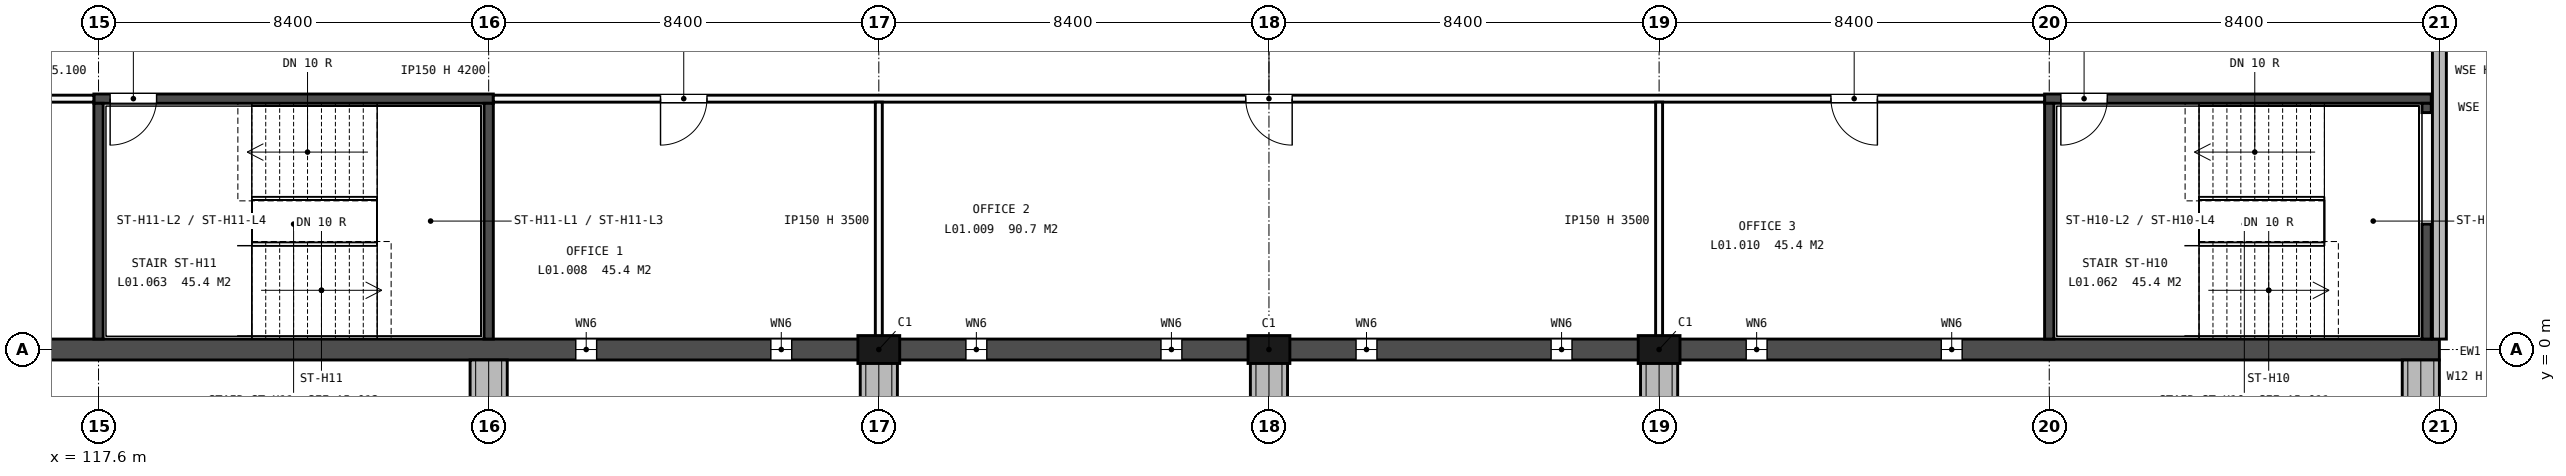
"""IFC4 building model, lengths in metres.
Left out: names, types, materials, properties, quantities, classifications, styles, units other than length and angle.
Written with IfcOpenShell. Run it as: python <this file> out.ifc"""

import sys

from ifc_helpers import new_model, si_unit, direction, frame, frame_2d, origin, origin_2d, place, context, subcontext, project, spatial, rectangle, extrude, element, fill, save


model = new_model("IFC4")
c1 = context("Model", 3, precision=1e-05, world=origin(), true_north=direction((0.0, 1.0)))
c2 = subcontext(c1, "Body", "Model", "MODEL_VIEW")
j1 = project(units=[si_unit("LENGTHUNIT", "METRE"), si_unit("PLANEANGLEUNIT", "RADIAN")], contexts=[c1])
p1 = place(None, origin())
s1 = spatial("IfcSite", under=j1, at=p1, CompositionType="ELEMENT")
p2 = place(p1, origin())
s2 = spatial("IfcBuilding", under=s1, at=p2, CompositionType="ELEMENT")
p3 = place(p2, frame((0.0, 0.0, 5.4)))
s3 = spatial("IfcBuildingStorey", under=s2, at=p3, CompositionType="ELEMENT", Elevation=5.4)
for number, where, z_axis, x_axis in (
    (1, (134.4, 0.0, -0.3), (0.0, 0.0, 1.0), (1.0, 0.0, 0.0)),
    (2, (142.8, 0.0, -0.3), (0.0, 0.0, 1.0), (1.0, 0.0, 0.0)),
    (3, (151.2, 0.0, -0.3), (0.0, 0.0, 1.0), (1.0, 0.0, 0.0)),
):
    element("IfcColumn", number, at=place(p3, frame(where, z_axis=z_axis, x_axis=x_axis)), inside=s3, PredefinedType="PILASTER", context=c2, shape_type="SweptSolid", body=[
        extrude(rectangle(XDim=0.9, YDim=0.6, at=origin_2d()), origin(), (0.0, 0.0, 1.0), 4.55),
    ])
p4 = place(p3, frame((0.0, 0.0, -0.3), z_axis=(0.0, 0.0, 1.0), x_axis=(1.0, 0.0, 0.0)))
e4 = element("IfcWall", 4, at=p4, inside=s3, PredefinedType="SOLIDWALL", context=c2, shape_type="SweptSolid", body=[
    extrude(rectangle(XDim=168.0, YDim=0.45, at=frame_2d((84.0, 0.0))), origin(), (0.0, 0.0, 1.0), 4.55),
])
p5 = place(p4, frame((27.075, 0.0, 1.5)))
e5 = element("IfcOpeningElement", 5, at=p5, cuts=e4, PredefinedType="OPENING", context=c2, shape_type="SweptSolid", body=[
    extrude(rectangle(XDim=0.45, YDim=2.4, at=frame_2d((0.225, 1.2))), frame((0.0, 0.235, 0.0), z_axis=(0.0, -1.0, 0.0), x_axis=(1.0, 0.0, 0.0)), (0.0, 0.0, 1.0), 0.47),
])
p6 = place(p4, frame((31.275, 0.0, 1.5)))
e6 = element("IfcOpeningElement", 6, at=p6, cuts=e4, PredefinedType="OPENING", context=c2, shape_type="SweptSolid", body=[
    extrude(rectangle(XDim=0.45, YDim=2.4, at=frame_2d((0.225, 1.2))), frame((0.0, 0.235, 0.0), z_axis=(0.0, -1.0, 0.0), x_axis=(1.0, 0.0, 0.0)), (0.0, 0.0, 1.0), 0.47),
])
p7 = place(p4, frame((35.475, 0.0, 1.5)))
e7 = element("IfcOpeningElement", 7, at=p7, cuts=e4, PredefinedType="OPENING", context=c2, shape_type="SweptSolid", body=[
    extrude(rectangle(XDim=0.45, YDim=2.4, at=frame_2d((0.225, 1.2))), frame((0.0, 0.235, 0.0), z_axis=(0.0, -1.0, 0.0), x_axis=(1.0, 0.0, 0.0)), (0.0, 0.0, 1.0), 0.47),
])
p8 = place(p4, frame((39.675, 0.0, 1.5)))
e8 = element("IfcOpeningElement", 8, at=p8, cuts=e4, PredefinedType="OPENING", context=c2, shape_type="SweptSolid", body=[
    extrude(rectangle(XDim=0.45, YDim=2.4, at=frame_2d((0.225, 1.2))), frame((0.0, 0.235, 0.0), z_axis=(0.0, -1.0, 0.0), x_axis=(1.0, 0.0, 0.0)), (0.0, 0.0, 1.0), 0.47),
])
p9 = place(p4, frame((94.275, 0.0, 1.5)))
e9 = element("IfcOpeningElement", 9, at=p9, cuts=e4, PredefinedType="OPENING", context=c2, shape_type="SweptSolid", body=[
    extrude(rectangle(XDim=0.45, YDim=2.4, at=frame_2d((0.225, 1.2))), frame((0.0, 0.235, 0.0), z_axis=(0.0, -1.0, 0.0), x_axis=(1.0, 0.0, 0.0)), (0.0, 0.0, 1.0), 0.47),
])
p10 = place(p4, frame((98.475, 0.0, 1.5)))
e10 = element("IfcOpeningElement", 10, at=p10, cuts=e4, PredefinedType="OPENING", context=c2, shape_type="SweptSolid", body=[
    extrude(rectangle(XDim=0.45, YDim=2.4, at=frame_2d((0.225, 1.2))), frame((0.0, 0.235, 0.0), z_axis=(0.0, -1.0, 0.0), x_axis=(1.0, 0.0, 0.0)), (0.0, 0.0, 1.0), 0.47),
])
p11 = place(p4, frame((102.675, 0.0, 1.5)))
e11 = element("IfcOpeningElement", 11, at=p11, cuts=e4, PredefinedType="OPENING", context=c2, shape_type="SweptSolid", body=[
    extrude(rectangle(XDim=0.45, YDim=2.4, at=frame_2d((0.225, 1.2))), frame((0.0, 0.235, 0.0), z_axis=(0.0, -1.0, 0.0), x_axis=(1.0, 0.0, 0.0)), (0.0, 0.0, 1.0), 0.47),
])
p12 = place(p4, frame((106.875, 0.0, 1.5)))
e12 = element("IfcOpeningElement", 12, at=p12, cuts=e4, PredefinedType="OPENING", context=c2, shape_type="SweptSolid", body=[
    extrude(rectangle(XDim=0.45, YDim=2.4, at=frame_2d((0.225, 1.2))), frame((0.0, 0.235, 0.0), z_axis=(0.0, -1.0, 0.0), x_axis=(1.0, 0.0, 0.0)), (0.0, 0.0, 1.0), 0.47),
])
p13 = place(p4, frame((111.075, 0.0, 1.5)))
e13 = element("IfcOpeningElement", 13, at=p13, cuts=e4, PredefinedType="OPENING", context=c2, shape_type="SweptSolid", body=[
    extrude(rectangle(XDim=0.45, YDim=2.4, at=frame_2d((0.225, 1.2))), frame((0.0, 0.235, 0.0), z_axis=(0.0, -1.0, 0.0), x_axis=(1.0, 0.0, 0.0)), (0.0, 0.0, 1.0), 0.47),
])
p14 = place(p4, frame((115.275, 0.0, 1.5)))
e14 = element("IfcOpeningElement", 14, at=p14, cuts=e4, PredefinedType="OPENING", context=c2, shape_type="SweptSolid", body=[
    extrude(rectangle(XDim=0.45, YDim=2.4, at=frame_2d((0.225, 1.2))), frame((0.0, 0.235, 0.0), z_axis=(0.0, -1.0, 0.0), x_axis=(1.0, 0.0, 0.0)), (0.0, 0.0, 1.0), 0.47),
])
p15 = place(p4, frame((127.875, 0.0, 1.5)))
e15 = element("IfcOpeningElement", 15, at=p15, cuts=e4, PredefinedType="OPENING", context=c2, shape_type="SweptSolid", body=[
    extrude(rectangle(XDim=0.45, YDim=2.4, at=frame_2d((0.225, 1.2))), frame((0.0, 0.235, 0.0), z_axis=(0.0, -1.0, 0.0), x_axis=(1.0, 0.0, 0.0)), (0.0, 0.0, 1.0), 0.47),
])
p16 = place(p4, frame((132.075, 0.0, 1.5)))
e16 = element("IfcOpeningElement", 16, at=p16, cuts=e4, PredefinedType="OPENING", context=c2, shape_type="SweptSolid", body=[
    extrude(rectangle(XDim=0.45, YDim=2.4, at=frame_2d((0.225, 1.2))), frame((0.0, 0.235, 0.0), z_axis=(0.0, -1.0, 0.0), x_axis=(1.0, 0.0, 0.0)), (0.0, 0.0, 1.0), 0.47),
])
p17 = place(p4, frame((136.275, 0.0, 1.5)))
e17 = element("IfcOpeningElement", 17, at=p17, cuts=e4, PredefinedType="OPENING", context=c2, shape_type="SweptSolid", body=[
    extrude(rectangle(XDim=0.45, YDim=2.4, at=frame_2d((0.225, 1.2))), frame((0.0, 0.235, 0.0), z_axis=(0.0, -1.0, 0.0), x_axis=(1.0, 0.0, 0.0)), (0.0, 0.0, 1.0), 0.47),
])
p18 = place(p4, frame((140.475, 0.0, 1.5)))
e18 = element("IfcOpeningElement", 18, at=p18, cuts=e4, PredefinedType="OPENING", context=c2, shape_type="SweptSolid", body=[
    extrude(rectangle(XDim=0.45, YDim=2.4, at=frame_2d((0.225, 1.2))), frame((0.0, 0.235, 0.0), z_axis=(0.0, -1.0, 0.0), x_axis=(1.0, 0.0, 0.0)), (0.0, 0.0, 1.0), 0.47),
])
p19 = place(p4, frame((144.675, 0.0, 1.5)))
e19 = element("IfcOpeningElement", 19, at=p19, cuts=e4, PredefinedType="OPENING", context=c2, shape_type="SweptSolid", body=[
    extrude(rectangle(XDim=0.45, YDim=2.4, at=frame_2d((0.225, 1.2))), frame((0.0, 0.235, 0.0), z_axis=(0.0, -1.0, 0.0), x_axis=(1.0, 0.0, 0.0)), (0.0, 0.0, 1.0), 0.47),
])
p20 = place(p4, frame((148.875, 0.0, 1.5)))
e20 = element("IfcOpeningElement", 20, at=p20, cuts=e4, PredefinedType="OPENING", context=c2, shape_type="SweptSolid", body=[
    extrude(rectangle(XDim=0.45, YDim=2.4, at=frame_2d((0.225, 1.2))), frame((0.0, 0.235, 0.0), z_axis=(0.0, -1.0, 0.0), x_axis=(1.0, 0.0, 0.0)), (0.0, 0.0, 1.0), 0.47),
])
p21 = place(p4, frame((153.075, 0.0, 1.5)))
e21 = element("IfcOpeningElement", 21, at=p21, cuts=e4, PredefinedType="OPENING", context=c2, shape_type="SweptSolid", body=[
    extrude(rectangle(XDim=0.45, YDim=2.4, at=frame_2d((0.225, 1.2))), frame((0.0, 0.235, 0.0), z_axis=(0.0, -1.0, 0.0), x_axis=(1.0, 0.0, 0.0)), (0.0, 0.0, 1.0), 0.47),
])
p22 = place(p4, frame((157.275, 0.0, 1.5)))
e22 = element("IfcOpeningElement", 22, at=p22, cuts=e4, PredefinedType="OPENING", context=c2, shape_type="SweptSolid", body=[
    extrude(rectangle(XDim=0.45, YDim=2.4, at=frame_2d((0.225, 1.2))), frame((0.0, 0.235, 0.0), z_axis=(0.0, -1.0, 0.0), x_axis=(1.0, 0.0, 0.0)), (0.0, 0.0, 1.0), 0.47),
])
p23 = place(p3, frame((168.0, 0.225, 0.0), z_axis=(0.0, 0.0, 1.0), x_axis=(0.0, 1.0, 0.0)))
e23 = element("IfcWall", 23, at=p23, inside=s3, PredefinedType="STANDARD", context=c2, shape_type="SweptSolid", body=[
    extrude(rectangle(XDim=7.85, YDim=0.3, at=frame_2d((3.925, 0.0))), origin(), (0.0, 0.0, 1.0), 4.2),
])
for number, where, z_axis, x_axis in (
    (24, (126.0, -0.225, -0.3), (0.0, 0.0, 1.0), (0.0, -1.0, 0.0)),
    (25, (134.4, -0.225, -0.3), (0.0, 0.0, 1.0), (0.0, -1.0, 0.0)),
    (26, (142.8, -0.225, -0.3), (0.0, 0.0, 1.0), (0.0, -1.0, 0.0)),
    (27, (151.2, -0.225, -0.3), (0.0, 0.0, 1.0), (0.0, -1.0, 0.0)),
    (28, (167.6, -0.225, -0.3), (0.0, 0.0, 1.0), (0.0, -1.0, 0.0)),
):
    element("IfcWall", number, at=place(p3, frame(where, z_axis=z_axis, x_axis=x_axis)), inside=s3, PredefinedType="SOLIDWALL", context=c2, shape_type="SweptSolid", body=[
        extrude(rectangle(XDim=0.9, YDim=0.8, at=frame_2d((0.45, 0.0))), origin(), (0.0, 0.0, 1.0), 4.55),
    ])
p24 = place(p3, frame((159.5, 5.4, -0.3), z_axis=(0.0, 0.0, 1.0), x_axis=(1.0, 0.0, 0.0)))
e29 = element("IfcWall", 29, at=p24, inside=s3, PredefinedType="SHEAR", context=c2, shape_type="SweptSolid", body=[
    extrude(rectangle(XDim=8.325, YDim=0.2, at=frame_2d((4.163, 0.0))), origin(), (0.0, 0.0, 1.0), 4.5),
])
p25 = place(p24, frame((0.35, 0.0, 0.3)))
e30 = element("IfcOpeningElement", 30, at=p25, cuts=e29, PredefinedType="OPENING", context=c2, shape_type="SweptSolid", body=[
    extrude(rectangle(XDim=1.0, YDim=2.1, at=frame_2d((0.5, 1.05))), frame((0.0, 0.11, 0.0), z_axis=(0.0, -1.0, 0.0), x_axis=(1.0, 0.0, 0.0)), (0.0, 0.0, 1.0), 0.22),
])
p26 = place(p3, frame((159.6, 0.225, -0.3), z_axis=(0.0, 0.0, 1.0), x_axis=(0.0, 1.0, 0.0)))
e31 = element("IfcWall", 31, at=p26, inside=s3, PredefinedType="SHEAR", context=c2, shape_type="SweptSolid", body=[
    extrude(rectangle(XDim=5.075, YDim=0.2, at=frame_2d((2.538, 0.0))), origin(), (0.0, 0.0, 1.0), 4.5),
])
p27 = place(p3, frame((167.725, 0.225, -0.3), z_axis=(0.0, 0.0, 1.0), x_axis=(0.0, 1.0, 0.0)))
e32 = element("IfcWall", 32, at=p27, inside=s3, PredefinedType="SHEAR", context=c2, shape_type="SweptSolid", body=[
    extrude(rectangle(XDim=2.475, YDim=0.2, at=frame_2d((1.237, 0.0))), origin(), (0.0, 0.0, 1.0), 4.5),
])
p28 = place(p3, frame((167.725, 5.1, -0.3), z_axis=(0.0, 0.0, 1.0), x_axis=(0.0, 1.0, 0.0)))
e33 = element("IfcWall", 33, at=p28, inside=s3, PredefinedType="SHEAR", context=c2, shape_type="SweptSolid", body=[
    extrude(rectangle(XDim=0.2, YDim=0.2, at=frame_2d((0.1, 0.0))), origin(), (0.0, 0.0, 1.0), 4.5),
])
p29 = place(p3, frame((117.5, 5.4, -0.3), z_axis=(0.0, 0.0, 1.0), x_axis=(1.0, 0.0, 0.0)))
e34 = element("IfcWall", 34, at=p29, inside=s3, PredefinedType="SHEAR", context=c2, shape_type="SweptSolid", body=[
    extrude(rectangle(XDim=8.6, YDim=0.2, at=frame_2d((4.3, 0.0))), origin(), (0.0, 0.0, 1.0), 4.5),
])
p30 = place(p29, frame((0.35, 0.0, 0.3)))
e35 = element("IfcOpeningElement", 35, at=p30, cuts=e34, PredefinedType="OPENING", context=c2, shape_type="SweptSolid", body=[
    extrude(rectangle(XDim=1.0, YDim=2.1, at=frame_2d((0.5, 1.05))), frame((0.0, 0.11, 0.0), z_axis=(0.0, -1.0, 0.0), x_axis=(1.0, 0.0, 0.0)), (0.0, 0.0, 1.0), 0.22),
])
for number, where, z_axis, x_axis in (
    (36, (117.6, 0.225, -0.3), (0.0, 0.0, 1.0), (0.0, 1.0, 0.0)),
    (37, (126.0, 0.225, -0.3), (0.0, 0.0, 1.0), (0.0, 1.0, 0.0)),
):
    element("IfcWall", number, at=place(p3, frame(where, z_axis=z_axis, x_axis=x_axis)), inside=s3, PredefinedType="SHEAR", context=c2, shape_type="SweptSolid", body=[
        extrude(rectangle(XDim=5.075, YDim=0.2, at=frame_2d((2.538, 0.0))), origin(), (0.0, 0.0, 1.0), 4.5),
    ])
p31 = place(p3, frame((63.1, 5.4, 0.0), z_axis=(0.0, 0.0, 1.0), x_axis=(1.0, 0.0, 0.0)))
e38 = element("IfcWall", 38, at=p31, inside=s3, PredefinedType="PARTITIONING", context=c2, shape_type="SweptSolid", body=[
    extrude(rectangle(XDim=54.4, YDim=0.15, at=frame_2d((27.2, 0.0))), origin(), (0.0, 0.0, 1.0), 4.2),
])
p32 = place(p31, frame((0.2, 0.0, 0.0)))
e39 = element("IfcOpeningElement", 39, at=p32, cuts=e38, PredefinedType="OPENING", context=c2, shape_type="SweptSolid", body=[
    extrude(rectangle(XDim=2.1, YDim=2.1, at=frame_2d((1.05, 1.05))), frame((0.0, 0.085, 0.0), z_axis=(0.0, -1.0, 0.0), x_axis=(1.0, 0.0, 0.0)), (0.0, 0.0, 1.0), 0.17),
])
p33 = place(p31, frame((18.6, 0.0, 0.0)))
e40 = element("IfcOpeningElement", 40, at=p33, cuts=e38, PredefinedType="OPENING", context=c2, shape_type="SweptSolid", body=[
    extrude(rectangle(XDim=2.1, YDim=2.1, at=frame_2d((1.05, 1.05))), frame((0.0, 0.085, 0.0), z_axis=(0.0, -1.0, 0.0), x_axis=(1.0, 0.0, 0.0)), (0.0, 0.0, 1.0), 0.17),
])
p34 = place(p31, frame((24.6, 0.0, 0.0)))
e41 = element("IfcOpeningElement", 41, at=p34, cuts=e38, PredefinedType="OPENING", context=c2, shape_type="SweptSolid", body=[
    extrude(rectangle(XDim=1.0, YDim=2.1, at=frame_2d((0.5, 1.05))), frame((0.0, 0.085, 0.0), z_axis=(0.0, -1.0, 0.0), x_axis=(1.0, 0.0, 0.0)), (0.0, 0.0, 1.0), 0.17),
])
p35 = place(p31, frame((41.15, 0.0, 0.0)))
e42 = element("IfcOpeningElement", 42, at=p35, cuts=e38, PredefinedType="OPENING", context=c2, shape_type="SweptSolid", body=[
    extrude(rectangle(XDim=1.5, YDim=2.1, at=frame_2d((0.75, 1.05))), frame((0.0, 0.085, 0.0), z_axis=(0.0, -1.0, 0.0), x_axis=(1.0, 0.0, 0.0)), (0.0, 0.0, 1.0), 0.17),
])
p36 = place(p3, frame((126.1, 5.4, 0.0), z_axis=(0.0, 0.0, 1.0), x_axis=(1.0, 0.0, 0.0)))
e43 = element("IfcWall", 43, at=p36, inside=s3, PredefinedType="PARTITIONING", context=c2, shape_type="SweptSolid", body=[
    extrude(rectangle(XDim=33.4, YDim=0.15, at=frame_2d((16.7, 0.0))), origin(), (0.0, 0.0, 1.0), 4.2),
])
p37 = place(p36, frame((3.6, 0.0, 0.0)))
e44 = element("IfcOpeningElement", 44, at=p37, cuts=e43, PredefinedType="OPENING", context=c2, shape_type="SweptSolid", body=[
    extrude(rectangle(XDim=1.0, YDim=2.1, at=frame_2d((0.5, 1.05))), frame((0.0, 0.085, 0.0), z_axis=(0.0, -1.0, 0.0), x_axis=(1.0, 0.0, 0.0)), (0.0, 0.0, 1.0), 0.17),
])
p38 = place(p36, frame((16.2, 0.0, 0.0)))
e45 = element("IfcOpeningElement", 45, at=p38, cuts=e43, PredefinedType="OPENING", context=c2, shape_type="SweptSolid", body=[
    extrude(rectangle(XDim=1.0, YDim=2.1, at=frame_2d((0.5, 1.05))), frame((0.0, 0.085, 0.0), z_axis=(0.0, -1.0, 0.0), x_axis=(1.0, 0.0, 0.0)), (0.0, 0.0, 1.0), 0.17),
])
p39 = place(p36, frame((28.8, 0.0, 0.0)))
e46 = element("IfcOpeningElement", 46, at=p39, cuts=e43, PredefinedType="OPENING", context=c2, shape_type="SweptSolid", body=[
    extrude(rectangle(XDim=1.0, YDim=2.1, at=frame_2d((0.5, 1.05))), frame((0.0, 0.085, 0.0), z_axis=(0.0, -1.0, 0.0), x_axis=(1.0, 0.0, 0.0)), (0.0, 0.0, 1.0), 0.17),
])
for number, where, z_axis, x_axis in (
    (47, (134.4, 0.225, 0.0), (0.0, 0.0, 1.0), (0.0, 1.0, 0.0)),
    (48, (151.2, 0.225, 0.0), (0.0, 0.0, 1.0), (0.0, 1.0, 0.0)),
):
    element("IfcWall", number, at=place(p3, frame(where, z_axis=z_axis, x_axis=x_axis)), inside=s3, PredefinedType="PARTITIONING", context=c2, shape_type="SweptSolid", body=[
        extrude(rectangle(XDim=5.1, YDim=0.15, at=frame_2d((2.55, 0.0))), origin(), (0.0, 0.0, 1.0), 3.5),
    ])
p40 = place(p15, origin())
e49 = element("IfcWindow", 49, at=p40, inside=s3, PartitioningType="SINGLE_PANEL", PredefinedType="WINDOW", context=c2, shape_type="SweptSolid", body=[
    extrude(rectangle(XDim=0.45, YDim=2.4, at=frame_2d((0.225, 1.2))), frame((0.0, 0.03, 0.0), z_axis=(0.0, -1.0, 0.0), x_axis=(1.0, 0.0, 0.0)), (0.0, 0.0, 1.0), 0.06),
])
fill(e15, e49)
p41 = place(p16, origin())
e50 = element("IfcWindow", 50, at=p41, inside=s3, PartitioningType="SINGLE_PANEL", PredefinedType="WINDOW", context=c2, shape_type="SweptSolid", body=[
    extrude(rectangle(XDim=0.45, YDim=2.4, at=frame_2d((0.225, 1.2))), frame((0.0, 0.03, 0.0), z_axis=(0.0, -1.0, 0.0), x_axis=(1.0, 0.0, 0.0)), (0.0, 0.0, 1.0), 0.06),
])
fill(e16, e50)
p42 = place(p17, origin())
e51 = element("IfcWindow", 51, at=p42, inside=s3, PartitioningType="SINGLE_PANEL", PredefinedType="WINDOW", context=c2, shape_type="SweptSolid", body=[
    extrude(rectangle(XDim=0.45, YDim=2.4, at=frame_2d((0.225, 1.2))), frame((0.0, 0.03, 0.0), z_axis=(0.0, -1.0, 0.0), x_axis=(1.0, 0.0, 0.0)), (0.0, 0.0, 1.0), 0.06),
])
fill(e17, e51)
p43 = place(p18, origin())
e52 = element("IfcWindow", 52, at=p43, inside=s3, PartitioningType="SINGLE_PANEL", PredefinedType="WINDOW", context=c2, shape_type="SweptSolid", body=[
    extrude(rectangle(XDim=0.45, YDim=2.4, at=frame_2d((0.225, 1.2))), frame((0.0, 0.03, 0.0), z_axis=(0.0, -1.0, 0.0), x_axis=(1.0, 0.0, 0.0)), (0.0, 0.0, 1.0), 0.06),
])
fill(e18, e52)
p44 = place(p19, origin())
e53 = element("IfcWindow", 53, at=p44, inside=s3, PartitioningType="SINGLE_PANEL", PredefinedType="WINDOW", context=c2, shape_type="SweptSolid", body=[
    extrude(rectangle(XDim=0.45, YDim=2.4, at=frame_2d((0.225, 1.2))), frame((0.0, 0.03, 0.0), z_axis=(0.0, -1.0, 0.0), x_axis=(1.0, 0.0, 0.0)), (0.0, 0.0, 1.0), 0.06),
])
fill(e19, e53)
p45 = place(p20, origin())
e54 = element("IfcWindow", 54, at=p45, inside=s3, PartitioningType="SINGLE_PANEL", PredefinedType="WINDOW", context=c2, shape_type="SweptSolid", body=[
    extrude(rectangle(XDim=0.45, YDim=2.4, at=frame_2d((0.225, 1.2))), frame((0.0, 0.03, 0.0), z_axis=(0.0, -1.0, 0.0), x_axis=(1.0, 0.0, 0.0)), (0.0, 0.0, 1.0), 0.06),
])
fill(e20, e54)
p46 = place(p21, origin())
e55 = element("IfcWindow", 55, at=p46, inside=s3, PartitioningType="SINGLE_PANEL", PredefinedType="WINDOW", context=c2, shape_type="SweptSolid", body=[
    extrude(rectangle(XDim=0.45, YDim=2.4, at=frame_2d((0.225, 1.2))), frame((0.0, 0.03, 0.0), z_axis=(0.0, -1.0, 0.0), x_axis=(1.0, 0.0, 0.0)), (0.0, 0.0, 1.0), 0.06),
])
fill(e21, e55)
p47 = place(p22, origin())
e56 = element("IfcWindow", 56, at=p47, inside=s3, PartitioningType="SINGLE_PANEL", PredefinedType="WINDOW", context=c2, shape_type="SweptSolid", body=[
    extrude(rectangle(XDim=0.45, YDim=2.4, at=frame_2d((0.225, 1.2))), frame((0.0, 0.03, 0.0), z_axis=(0.0, -1.0, 0.0), x_axis=(1.0, 0.0, 0.0)), (0.0, 0.0, 1.0), 0.06),
])
fill(e22, e56)
p48 = place(p25, origin())
e57 = element("IfcDoor", 57, at=p48, inside=s3, OperationType="SINGLE_SWING_LEFT", PredefinedType="DOOR", context=c2, shape_type="SweptSolid", body=[
    extrude(rectangle(XDim=1.0, YDim=2.1, at=frame_2d((0.5, 1.05))), frame((0.0, 0.025, 0.0), z_axis=(0.0, -1.0, 0.0), x_axis=(1.0, 0.0, 0.0)), (0.0, 0.0, 1.0), 0.05),
])
fill(e30, e57)
p49 = place(p30, origin())
e58 = element("IfcDoor", 58, at=p49, inside=s3, OperationType="SINGLE_SWING_LEFT", PredefinedType="DOOR", context=c2, shape_type="SweptSolid", body=[
    extrude(rectangle(XDim=1.0, YDim=2.1, at=frame_2d((0.5, 1.05))), frame((0.0, 0.025, 0.0), z_axis=(0.0, -1.0, 0.0), x_axis=(1.0, 0.0, 0.0)), (0.0, 0.0, 1.0), 0.05),
])
fill(e35, e58)
p50 = place(p37, origin())
e59 = element("IfcDoor", 59, at=p50, inside=s3, OperationType="SINGLE_SWING_LEFT", PredefinedType="DOOR", context=c2, shape_type="SweptSolid", body=[
    extrude(rectangle(XDim=1.0, YDim=2.1, at=frame_2d((0.5, 1.05))), frame((0.0, 0.025, 0.0), z_axis=(0.0, -1.0, 0.0), x_axis=(1.0, 0.0, 0.0)), (0.0, 0.0, 1.0), 0.05),
])
fill(e44, e59)
p51 = place(p38, origin())
e60 = element("IfcDoor", 60, at=p51, inside=s3, OperationType="SINGLE_SWING_RIGHT", PredefinedType="DOOR", context=c2, shape_type="SweptSolid", body=[
    extrude(rectangle(XDim=1.0, YDim=2.1, at=frame_2d((0.5, 1.05))), frame((0.0, 0.025, 0.0), z_axis=(0.0, -1.0, 0.0), x_axis=(1.0, 0.0, 0.0)), (0.0, 0.0, 1.0), 0.05),
])
fill(e45, e60)
p52 = place(p39, origin())
e61 = element("IfcDoor", 61, at=p52, inside=s3, OperationType="SINGLE_SWING_RIGHT", PredefinedType="DOOR", context=c2, shape_type="SweptSolid", body=[
    extrude(rectangle(XDim=1.0, YDim=2.1, at=frame_2d((0.5, 1.05))), frame((0.0, 0.025, 0.0), z_axis=(0.0, -1.0, 0.0), x_axis=(1.0, 0.0, 0.0)), (0.0, 0.0, 1.0), 0.05),
])
fill(e46, e61)
save(model, sys.argv[1])
